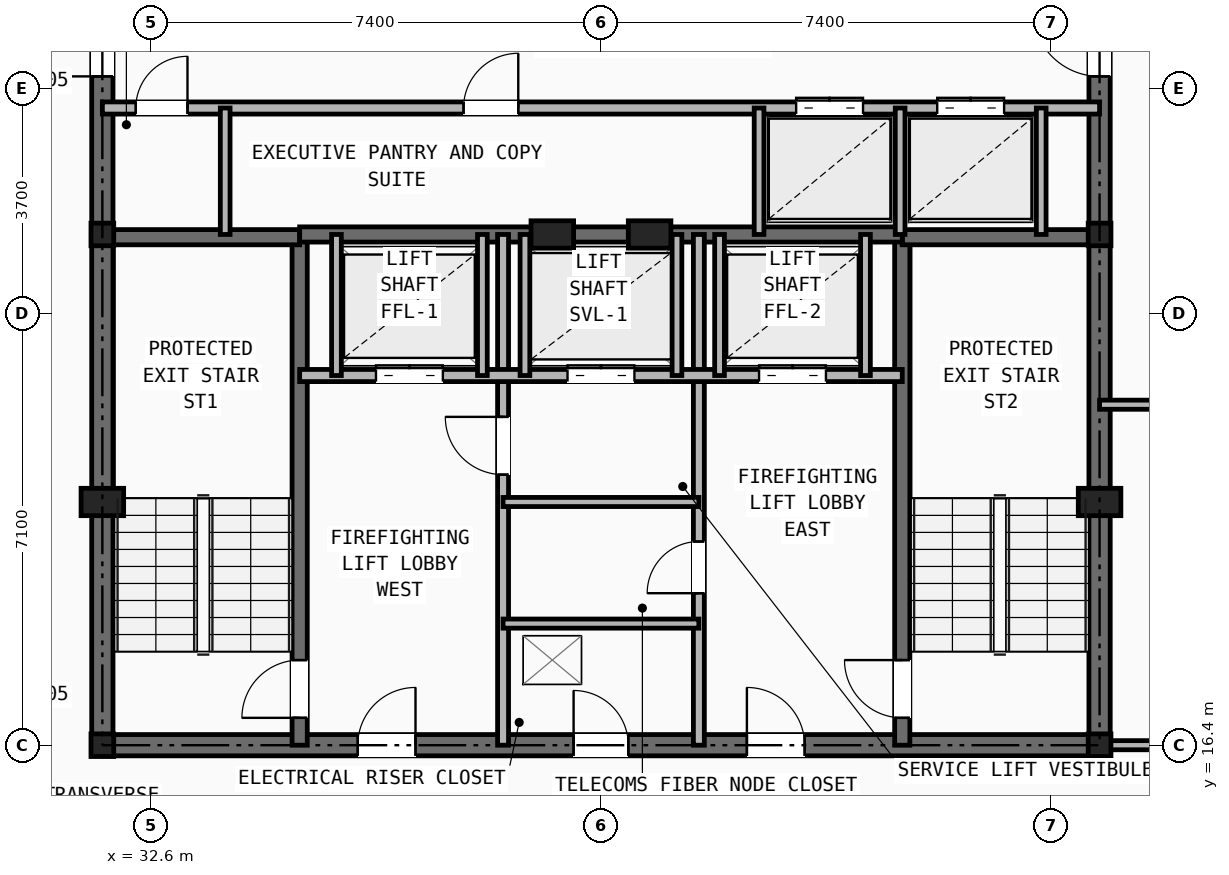
"""IFC4 building model, lengths in metres.
Left out: names, types, materials, properties, quantities, classifications, styles, units other than length and angle.
Written with IfcOpenShell. Run it as: python <this file> out.ifc"""

import sys

from ifc_helpers import new_model, si_unit, direction, frame, frame_2d, origin, origin_2d, place, context, subcontext, project, spatial, rectangle, i_section, extrude, element, fill, save


model = new_model("IFC4")
c1 = context("Model", 3, precision=1e-05, world=origin(), true_north=direction((0.0, 1.0)))
c2 = subcontext(c1, "Body", "Model", "MODEL_VIEW")
j1 = project(units=[si_unit("LENGTHUNIT", "METRE"), si_unit("PLANEANGLEUNIT", "RADIAN")], contexts=[c1])
p1 = place(None, origin())
s1 = spatial("IfcSite", under=j1, at=p1, CompositionType="ELEMENT")
p2 = place(p1, origin())
s2 = spatial("IfcBuilding", under=s1, at=p2, CompositionType="ELEMENT")
p3 = place(p2, frame((0.0, 0.0, 218.9)))
s3 = spatial("IfcBuildingStorey", under=s2, at=p3, CompositionType="ELEMENT", Elevation=218.9)
for number, where, z_axis, x_axis in (
    (1, (31.8, 16.4, 0.0), (0.0, 0.0, 1.0), (1.0, 0.0, 0.0)),
    (2, (48.2, 16.4, 0.0), (0.0, 0.0, 1.0), (1.0, 0.0, 0.0)),
    (3, (31.8, 24.8, 0.0), (0.0, 0.0, 1.0), (1.0, 0.0, 0.0)),
    (4, (48.2, 24.8, 0.0), (0.0, 0.0, 1.0), (1.0, 0.0, 0.0)),
):
    element("IfcColumn", number, at=place(p3, frame(where, z_axis=z_axis, x_axis=x_axis)), inside=s3, PredefinedType="COLUMN", context=c2, shape_type="SweptSolid", body=[
        extrude(i_section(OverallWidth=0.374, OverallDepth=0.372, WebThickness=0.016, FlangeThickness=0.026, at=origin_2d()), origin(), (0.0, 0.0, 1.0), 3.5),
    ])
for number, where, z_axis, x_axis in (
    (5, (31.8, 20.4, 0.0), (0.0, 0.0, 1.0), (1.0, 0.0, 0.0)),
    (6, (48.2, 20.4, 0.0), (0.0, 0.0, 1.0), (1.0, 0.0, 0.0)),
    (7, (39.2, 24.8, 0.0), (0.0, 0.0, 1.0), (1.0, 0.0, 0.0)),
    (8, (40.8, 24.8, 0.0), (0.0, 0.0, 1.0), (1.0, 0.0, 0.0)),
):
    element("IfcColumn", number, at=place(p3, frame(where, z_axis=z_axis, x_axis=x_axis)), inside=s3, PredefinedType="PILASTER", context=c2, shape_type="SweptSolid", body=[
        extrude(rectangle(XDim=0.7, YDim=0.45, at=origin_2d()), origin(), (0.0, 0.0, 1.0), 3.5),
    ])
p4 = place(p3, frame((31.8, 16.4, 0.0), z_axis=(0.0, 0.0, 1.0), x_axis=(1.0, 0.0, 0.0)))
e9 = element("IfcWall", 9, at=p4, inside=s3, PredefinedType="SHEAR", context=c2, shape_type="SweptSolid", body=[
    extrude(rectangle(XDim=16.4, YDim=0.35, at=frame_2d((8.2, 0.0))), origin(), (0.0, 0.0, 1.0), 3.25),
])
p5 = place(p4, frame((7.75, 0.0, 0.0)))
e10 = element("IfcOpeningElement", 10, at=p5, cuts=e9, PredefinedType="OPENING", context=c2, shape_type="SweptSolid", body=[
    extrude(rectangle(XDim=0.9, YDim=2.1, at=frame_2d((0.45, 1.05))), frame((0.0, 0.185, 0.0), z_axis=(0.0, -1.0, 0.0), x_axis=(1.0, 0.0, 0.0)), (0.0, 0.0, 1.0), 0.37),
])
p6 = place(p4, frame((4.2, 0.0, 0.0)))
e11 = element("IfcOpeningElement", 11, at=p6, cuts=e9, PredefinedType="OPENING", context=c2, shape_type="SweptSolid", body=[
    extrude(rectangle(XDim=0.95, YDim=2.1, at=frame_2d((0.475, 1.05))), frame((0.0, 0.185, 0.0), z_axis=(0.0, -1.0, 0.0), x_axis=(1.0, 0.0, 0.0)), (0.0, 0.0, 1.0), 0.37),
])
p7 = place(p4, frame((10.6, 0.0, 0.0)))
e12 = element("IfcOpeningElement", 12, at=p7, cuts=e9, PredefinedType="OPENING", context=c2, shape_type="SweptSolid", body=[
    extrude(rectangle(XDim=0.95, YDim=2.1, at=frame_2d((0.475, 1.05))), frame((0.0, 0.185, 0.0), z_axis=(0.0, -1.0, 0.0), x_axis=(1.0, 0.0, 0.0)), (0.0, 0.0, 1.0), 0.37),
])
p8 = place(p3, frame((31.8, 16.4, 0.0), z_axis=(0.0, 0.0, 1.0), x_axis=(0.0, 1.0, 0.0)))
e13 = element("IfcWall", 13, at=p8, inside=s3, PredefinedType="SHEAR", context=c2, shape_type="SweptSolid", body=[
    extrude(rectangle(XDim=14.8, YDim=0.35, at=frame_2d((7.4, 0.0))), origin(), (0.0, 0.0, 1.0), 3.25),
])
p9 = place(p8, frame((11.0, 0.0, 0.0)))
e14 = element("IfcOpeningElement", 14, at=p9, cuts=e13, PredefinedType="OPENING", context=c2, shape_type="SweptSolid", body=[
    extrude(rectangle(XDim=1.1, YDim=2.15, at=frame_2d((0.55, 1.075))), frame((0.0, 0.185, 0.0), z_axis=(0.0, -1.0, 0.0), x_axis=(1.0, 0.0, 0.0)), (0.0, 0.0, 1.0), 0.37),
])
p10 = place(p3, frame((48.2, 16.4, 0.0), z_axis=(0.0, 0.0, 1.0), x_axis=(0.0, 1.0, 0.0)))
e15 = element("IfcWall", 15, at=p10, inside=s3, PredefinedType="SHEAR", context=c2, shape_type="SweptSolid", body=[
    extrude(rectangle(XDim=14.8, YDim=0.35, at=frame_2d((7.4, 0.0))), origin(), (0.0, 0.0, 1.0), 3.25),
])
p11 = place(p10, frame((11.0, 0.0, 0.0)))
e16 = element("IfcOpeningElement", 16, at=p11, cuts=e15, PredefinedType="OPENING", context=c2, shape_type="SweptSolid", body=[
    extrude(rectangle(XDim=1.1, YDim=2.15, at=frame_2d((0.55, 1.075))), frame((0.0, 0.185, 0.0), z_axis=(0.0, -1.0, 0.0), x_axis=(1.0, 0.0, 0.0)), (0.0, 0.0, 1.0), 0.37),
])
p12 = place(p3, frame((35.045, 16.4, 0.0), z_axis=(0.0, 0.0, 1.0), x_axis=(0.0, 1.0, 0.0)))
e17 = element("IfcWall", 17, at=p12, inside=s3, PredefinedType="SHEAR", context=c2, shape_type="SweptSolid", body=[
    extrude(rectangle(XDim=8.4, YDim=0.25, at=frame_2d((4.2, 0.0))), origin(), (0.0, 0.0, 1.0), 3.25),
])
p13 = place(p12, frame((0.45, 0.0, 0.0)))
e18 = element("IfcOpeningElement", 18, at=p13, cuts=e17, PredefinedType="OPENING", context=c2, shape_type="SweptSolid", body=[
    extrude(rectangle(XDim=0.95, YDim=2.1, at=frame_2d((0.475, 1.05))), frame((0.0, 0.135, 0.0), z_axis=(0.0, -1.0, 0.0), x_axis=(1.0, 0.0, 0.0)), (0.0, 0.0, 1.0), 0.27),
])
p14 = place(p3, frame((31.8, 24.755, 0.0), z_axis=(0.0, 0.0, 1.0), x_axis=(1.0, 0.0, 0.0)))
e19 = element("IfcWall", 19, at=p14, inside=s3, PredefinedType="SHEAR", context=c2, shape_type="SweptSolid", body=[
    extrude(rectangle(XDim=3.245, YDim=0.25, at=frame_2d((1.623, 0.0))), origin(), (0.0, 0.0, 1.0), 3.25),
])
p15 = place(p3, frame((44.955, 16.4, 0.0), z_axis=(0.0, 0.0, 1.0), x_axis=(0.0, 1.0, 0.0)))
e20 = element("IfcWall", 20, at=p15, inside=s3, PredefinedType="SHEAR", context=c2, shape_type="SweptSolid", body=[
    extrude(rectangle(XDim=8.4, YDim=0.25, at=frame_2d((4.2, 0.0))), origin(), (0.0, 0.0, 1.0), 3.25),
])
p16 = place(p15, frame((0.45, 0.0, 0.0)))
e21 = element("IfcOpeningElement", 21, at=p16, cuts=e20, PredefinedType="OPENING", context=c2, shape_type="SweptSolid", body=[
    extrude(rectangle(XDim=0.95, YDim=2.1, at=frame_2d((0.475, 1.05))), frame((0.0, 0.135, 0.0), z_axis=(0.0, -1.0, 0.0), x_axis=(1.0, 0.0, 0.0)), (0.0, 0.0, 1.0), 0.27),
])
p17 = place(p3, frame((44.955, 24.755, 0.0), z_axis=(0.0, 0.0, 1.0), x_axis=(1.0, 0.0, 0.0)))
e22 = element("IfcWall", 22, at=p17, inside=s3, PredefinedType="SHEAR", context=c2, shape_type="SweptSolid", body=[
    extrude(rectangle(XDim=3.245, YDim=0.25, at=frame_2d((1.623, 0.0))), origin(), (0.0, 0.0, 1.0), 3.25),
])
p18 = place(p3, frame((35.045, 24.8, 0.0), z_axis=(0.0, 0.0, 1.0), x_axis=(1.0, 0.0, 0.0)))
e23 = element("IfcWall", 23, at=p18, inside=s3, PredefinedType="SHEAR", context=c2, shape_type="SweptSolid", body=[
    extrude(rectangle(XDim=9.91, YDim=0.25, at=frame_2d((4.955, 0.0))), origin(), (0.0, 0.0, 1.0), 3.25),
])
p19 = place(p3, frame((38.39, 16.4, 0.0), z_axis=(0.0, 0.0, 1.0), x_axis=(0.0, 1.0, 0.0)))
e24 = element("IfcWall", 24, at=p19, inside=s3, PredefinedType="PARTITIONING", context=c2, shape_type="SweptSolid", body=[
    extrude(rectangle(XDim=8.4, YDim=0.18, at=frame_2d((4.2, 0.0))), origin(), (0.0, 0.0, 1.0), 2.705),
])
p20 = place(p19, frame((4.45, 0.0, 0.0)))
e25 = element("IfcOpeningElement", 25, at=p20, cuts=e24, PredefinedType="OPENING", context=c2, shape_type="SweptSolid", body=[
    extrude(rectangle(XDim=0.95, YDim=2.1, at=frame_2d((0.475, 1.05))), frame((0.0, 0.1, 0.0), z_axis=(0.0, -1.0, 0.0), x_axis=(1.0, 0.0, 0.0)), (0.0, 0.0, 1.0), 0.2),
])
p21 = place(p3, frame((41.61, 16.4, 0.0), z_axis=(0.0, 0.0, 1.0), x_axis=(0.0, 1.0, 0.0)))
e26 = element("IfcWall", 26, at=p21, inside=s3, PredefinedType="PARTITIONING", context=c2, shape_type="SweptSolid", body=[
    extrude(rectangle(XDim=8.4, YDim=0.18, at=frame_2d((4.2, 0.0))), origin(), (0.0, 0.0, 1.0), 2.705),
])
p22 = place(p21, frame((2.5, 0.0, 0.0)))
e27 = element("IfcOpeningElement", 27, at=p22, cuts=e26, PredefinedType="OPENING", context=c2, shape_type="SweptSolid", body=[
    extrude(rectangle(XDim=0.85, YDim=2.05, at=frame_2d((0.425, 1.025))), frame((0.0, 0.1, 0.0), z_axis=(0.0, -1.0, 0.0), x_axis=(1.0, 0.0, 0.0)), (0.0, 0.0, 1.0), 0.2),
])
p23 = place(p3, frame((35.045, 22.48, 0.0), z_axis=(0.0, 0.0, 1.0), x_axis=(1.0, 0.0, 0.0)))
e28 = element("IfcWall", 28, at=p23, inside=s3, PredefinedType="SOLIDWALL", context=c2, shape_type="SweptSolid", body=[
    extrude(rectangle(XDim=9.91, YDim=0.2, at=frame_2d((4.955, 0.0))), origin(), (0.0, 0.0, 1.0), 3.25),
])
p24 = place(p23, frame((1.255, 0.0, 0.0)))
e29 = element("IfcOpeningElement", 29, at=p24, cuts=e28, PredefinedType="OPENING", context=c2, shape_type="SweptSolid", body=[
    extrude(rectangle(XDim=1.1, YDim=2.15, at=frame_2d((0.55, 1.075))), frame((0.0, 0.11, 0.0), z_axis=(0.0, -1.0, 0.0), x_axis=(1.0, 0.0, 0.0)), (0.0, 0.0, 1.0), 0.22),
])
p25 = place(p23, frame((7.555, 0.0, 0.0)))
e30 = element("IfcOpeningElement", 30, at=p25, cuts=e28, PredefinedType="OPENING", context=c2, shape_type="SweptSolid", body=[
    extrude(rectangle(XDim=1.1, YDim=2.15, at=frame_2d((0.55, 1.075))), frame((0.0, 0.11, 0.0), z_axis=(0.0, -1.0, 0.0), x_axis=(1.0, 0.0, 0.0)), (0.0, 0.0, 1.0), 0.22),
])
p26 = place(p23, frame((4.405, 0.0, 0.0)))
e31 = element("IfcOpeningElement", 31, at=p26, cuts=e28, PredefinedType="OPENING", context=c2, shape_type="SweptSolid", body=[
    extrude(rectangle(XDim=1.1, YDim=2.15, at=frame_2d((0.55, 1.075))), frame((0.0, 0.11, 0.0), z_axis=(0.0, -1.0, 0.0), x_axis=(1.0, 0.0, 0.0)), (0.0, 0.0, 1.0), 0.22),
])
for number, where, z_axis, x_axis in (
    (32, (38.39, 18.4, 0.0), (0.0, 0.0, 1.0), (1.0, 0.0, 0.0)),
    (33, (38.39, 20.4, 0.0), (0.0, 0.0, 1.0), (1.0, 0.0, 0.0)),
):
    element("IfcWall", number, at=place(p3, frame(where, z_axis=z_axis, x_axis=x_axis)), inside=s3, PredefinedType="PARTITIONING", context=c2, shape_type="SweptSolid", body=[
        extrude(rectangle(XDim=3.22, YDim=0.15, at=frame_2d((1.61, 0.0))), origin(), (0.0, 0.0, 1.0), 3.25),
    ])
for number, where, z_axis, x_axis in (
    (34, (35.65, 22.48, 0.0), (0.0, 0.0, 1.0), (0.0, 1.0, 0.0)),
    (35, (38.05, 22.48, 0.0), (0.0, 0.0, 1.0), (0.0, 1.0, 0.0)),
    (36, (41.95, 22.48, 0.0), (0.0, 0.0, 1.0), (0.0, 1.0, 0.0)),
    (37, (44.35, 22.48, 0.0), (0.0, 0.0, 1.0), (0.0, 1.0, 0.0)),
    (38, (38.75, 22.48, 0.0), (0.0, 0.0, 1.0), (0.0, 1.0, 0.0)),
    (39, (41.25, 22.48, 0.0), (0.0, 0.0, 1.0), (0.0, 1.0, 0.0)),
):
    element("IfcWall", number, at=place(p3, frame(where, z_axis=z_axis, x_axis=x_axis)), inside=s3, PredefinedType="SOLIDWALL", context=c2, shape_type="SweptSolid", body=[
        extrude(rectangle(XDim=2.32, YDim=0.16, at=frame_2d((1.16, 0.0))), origin(), (0.0, 0.0, 1.0), 3.25),
    ])
p27 = place(p3, frame((31.8, 26.88, 0.0), z_axis=(0.0, 0.0, 1.0), x_axis=(1.0, 0.0, 0.0)))
e40 = element("IfcWall", 40, at=p27, inside=s3, PredefinedType="SOLIDWALL", context=c2, shape_type="SweptSolid", body=[
    extrude(rectangle(XDim=16.4, YDim=0.2, at=frame_2d((8.2, 0.0))), origin(), (0.0, 0.0, 1.0), 2.705),
])
p28 = place(p27, frame((0.55, 0.0, 0.0)))
e41 = element("IfcOpeningElement", 41, at=p28, cuts=e40, PredefinedType="OPENING", context=c2, shape_type="SweptSolid", body=[
    extrude(rectangle(XDim=0.85, YDim=2.05, at=frame_2d((0.425, 1.025))), frame((0.0, 0.11, 0.0), z_axis=(0.0, -1.0, 0.0), x_axis=(1.0, 0.0, 0.0)), (0.0, 0.0, 1.0), 0.22),
])
p29 = place(p27, frame((5.94, 0.0, 0.0)))
e42 = element("IfcOpeningElement", 42, at=p29, cuts=e40, PredefinedType="OPENING", context=c2, shape_type="SweptSolid", body=[
    extrude(rectangle(XDim=0.9, YDim=2.1, at=frame_2d((0.45, 1.05))), frame((0.0, 0.11, 0.0), z_axis=(0.0, -1.0, 0.0), x_axis=(1.0, 0.0, 0.0)), (0.0, 0.0, 1.0), 0.22),
])
p30 = place(p27, frame((11.41, 0.0, 0.0)))
e43 = element("IfcOpeningElement", 43, at=p30, cuts=e40, PredefinedType="OPENING", context=c2, shape_type="SweptSolid", body=[
    extrude(rectangle(XDim=1.1, YDim=2.15, at=frame_2d((0.55, 1.075))), frame((0.0, 0.11, 0.0), z_axis=(0.0, -1.0, 0.0), x_axis=(1.0, 0.0, 0.0)), (0.0, 0.0, 1.0), 0.22),
])
p31 = place(p27, frame((13.73, 0.0, 0.0)))
e44 = element("IfcOpeningElement", 44, at=p31, cuts=e40, PredefinedType="OPENING", context=c2, shape_type="SweptSolid", body=[
    extrude(rectangle(XDim=1.1, YDim=2.15, at=frame_2d((0.55, 1.075))), frame((0.0, 0.11, 0.0), z_axis=(0.0, -1.0, 0.0), x_axis=(1.0, 0.0, 0.0)), (0.0, 0.0, 1.0), 0.22),
])
for number, where, z_axis, x_axis in (
    (45, (33.82, 24.8, 0.0), (0.0, 0.0, 1.0), (0.0, 1.0, 0.0)),
    (46, (42.6, 24.8, 0.0), (0.0, 0.0, 1.0), (0.0, 1.0, 0.0)),
    (47, (44.92, 24.8, 0.0), (0.0, 0.0, 1.0), (0.0, 1.0, 0.0)),
    (48, (47.24, 24.8, 0.0), (0.0, 0.0, 1.0), (0.0, 1.0, 0.0)),
):
    element("IfcWall", number, at=place(p3, frame(where, z_axis=z_axis, x_axis=x_axis)), inside=s3, PredefinedType="SOLIDWALL", context=c2, shape_type="SweptSolid", body=[
        extrude(rectangle(XDim=2.08, YDim=0.16, at=frame_2d((1.04, 0.0))), origin(), (0.0, 0.0, 1.0), 3.25),
    ])
p32 = place(p3, frame((48.2, 16.4, 0.0), z_axis=(0.0, 0.0, 1.0), x_axis=(1.0, 0.0, 0.0)))
e49 = element("IfcWall", 49, at=p32, inside=s3, PredefinedType="PARTITIONING", context=c2, shape_type="SweptSolid", body=[
    extrude(rectangle(XDim=15.888, YDim=0.15, at=frame_2d((7.944, 0.0))), origin(), (0.0, 0.0, 1.0), 2.292),
])
p33 = place(p3, frame((48.2, 22.0, 0.0), z_axis=(0.0, 0.0, 1.0), x_axis=(1.0, 0.0, 0.0)))
e50 = element("IfcWall", 50, at=p33, inside=s3, PredefinedType="PARTITIONING", context=c2, shape_type="SweptSolid", body=[
    extrude(rectangle(XDim=12.052, YDim=0.15, at=frame_2d((6.026, 0.0))), origin(), (0.0, 0.0, 1.0), 2.292),
])
p34 = place(p33, frame((1.4, 0.0, 0.0)))
e51 = element("IfcOpeningElement", 51, at=p34, cuts=e50, PredefinedType="OPENING", context=c2, shape_type="SweptSolid", body=[
    extrude(rectangle(XDim=0.95, YDim=2.1, at=frame_2d((0.475, 1.05))), frame((0.0, 0.085, 0.0), z_axis=(0.0, -1.0, 0.0), x_axis=(1.0, 0.0, 0.0)), (0.0, 0.0, 1.0), 0.17),
])
p35 = place(p5, origin())
e52 = element("IfcDoor", 52, at=p35, inside=s3, OperationType="SINGLE_SWING_LEFT", PredefinedType="DOOR", context=c2, shape_type="SweptSolid", body=[
    extrude(rectangle(XDim=0.9, YDim=2.1, at=frame_2d((0.45, 1.05))), frame((0.0, 0.025, 0.0), z_axis=(0.0, -1.0, 0.0), x_axis=(1.0, 0.0, 0.0)), (0.0, 0.0, 1.0), 0.05),
])
fill(e10, e52)
p36 = place(p22, origin())
e53 = element("IfcDoor", 53, at=p36, inside=s3, OperationType="SINGLE_SWING_LEFT", PredefinedType="DOOR", context=c2, shape_type="SweptSolid", body=[
    extrude(rectangle(XDim=0.85, YDim=2.05, at=frame_2d((0.425, 1.025))), frame((0.0, 0.025, 0.0), z_axis=(0.0, -1.0, 0.0), x_axis=(1.0, 0.0, 0.0)), (0.0, 0.0, 1.0), 0.05),
])
fill(e27, e53)
p37 = place(p20, origin())
e54 = element("IfcDoor", 54, at=p37, inside=s3, OperationType="SINGLE_SWING_RIGHT", PredefinedType="DOOR", context=c2, shape_type="SweptSolid", body=[
    extrude(rectangle(XDim=0.95, YDim=2.1, at=frame_2d((0.475, 1.05))), frame((0.0, 0.025, 0.0), z_axis=(0.0, -1.0, 0.0), x_axis=(1.0, 0.0, 0.0)), (0.0, 0.0, 1.0), 0.05),
])
fill(e25, e54)
p38 = place(p13, origin())
e55 = element("IfcDoor", 55, at=p38, inside=s3, OperationType="SINGLE_SWING_LEFT", PredefinedType="DOOR", context=c2, shape_type="SweptSolid", body=[
    extrude(rectangle(XDim=0.95, YDim=2.1, at=frame_2d((0.475, 1.05))), frame((0.0, 0.025, 0.0), z_axis=(0.0, -1.0, 0.0), x_axis=(1.0, 0.0, 0.0)), (0.0, 0.0, 1.0), 0.05),
])
fill(e18, e55)
p39 = place(p16, origin())
e56 = element("IfcDoor", 56, at=p39, inside=s3, OperationType="SINGLE_SWING_RIGHT", PredefinedType="DOOR", context=c2, shape_type="SweptSolid", body=[
    extrude(rectangle(XDim=0.95, YDim=2.1, at=frame_2d((0.475, 1.05))), frame((0.0, 0.025, 0.0), z_axis=(0.0, -1.0, 0.0), x_axis=(1.0, 0.0, 0.0)), (0.0, 0.0, 1.0), 0.05),
])
fill(e21, e56)
p40 = place(p6, origin())
e57 = element("IfcDoor", 57, at=p40, inside=s3, OperationType="SINGLE_SWING_RIGHT", PredefinedType="DOOR", context=c2, shape_type="SweptSolid", body=[
    extrude(rectangle(XDim=0.95, YDim=2.1, at=frame_2d((0.475, 1.05))), frame((0.0, 0.025, 0.0), z_axis=(0.0, -1.0, 0.0), x_axis=(1.0, 0.0, 0.0)), (0.0, 0.0, 1.0), 0.05),
])
fill(e11, e57)
p41 = place(p7, origin())
e58 = element("IfcDoor", 58, at=p41, inside=s3, OperationType="SINGLE_SWING_LEFT", PredefinedType="DOOR", context=c2, shape_type="SweptSolid", body=[
    extrude(rectangle(XDim=0.95, YDim=2.1, at=frame_2d((0.475, 1.05))), frame((0.0, 0.025, 0.0), z_axis=(0.0, -1.0, 0.0), x_axis=(1.0, 0.0, 0.0)), (0.0, 0.0, 1.0), 0.05),
])
fill(e12, e58)
p42 = place(p24, origin())
e59 = element("IfcDoor", 59, at=p42, inside=s3, OperationType="DOUBLE_DOOR_SLIDING", PredefinedType="DOOR", context=c2, shape_type="SweptSolid", body=[
    extrude(rectangle(XDim=1.1, YDim=2.15, at=frame_2d((0.55, 1.075))), frame((0.0, 0.025, 0.0), z_axis=(0.0, -1.0, 0.0), x_axis=(1.0, 0.0, 0.0)), (0.0, 0.0, 1.0), 0.05),
])
fill(e29, e59)
p43 = place(p25, origin())
e60 = element("IfcDoor", 60, at=p43, inside=s3, OperationType="DOUBLE_DOOR_SLIDING", PredefinedType="DOOR", context=c2, shape_type="SweptSolid", body=[
    extrude(rectangle(XDim=1.1, YDim=2.15, at=frame_2d((0.55, 1.075))), frame((0.0, 0.025, 0.0), z_axis=(0.0, -1.0, 0.0), x_axis=(1.0, 0.0, 0.0)), (0.0, 0.0, 1.0), 0.05),
])
fill(e30, e60)
p44 = place(p26, origin())
e61 = element("IfcDoor", 61, at=p44, inside=s3, OperationType="DOUBLE_DOOR_SLIDING", PredefinedType="DOOR", context=c2, shape_type="SweptSolid", body=[
    extrude(rectangle(XDim=1.1, YDim=2.15, at=frame_2d((0.55, 1.075))), frame((0.0, 0.025, 0.0), z_axis=(0.0, -1.0, 0.0), x_axis=(1.0, 0.0, 0.0)), (0.0, 0.0, 1.0), 0.05),
])
fill(e31, e61)
p45 = place(p28, origin())
e62 = element("IfcDoor", 62, at=p45, inside=s3, OperationType="SINGLE_SWING_RIGHT", PredefinedType="DOOR", context=c2, shape_type="SweptSolid", body=[
    extrude(rectangle(XDim=0.85, YDim=2.05, at=frame_2d((0.425, 1.025))), frame((0.0, 0.025, 0.0), z_axis=(0.0, -1.0, 0.0), x_axis=(1.0, 0.0, 0.0)), (0.0, 0.0, 1.0), 0.05),
])
fill(e41, e62)
p46 = place(p9, origin())
e63 = element("IfcDoor", 63, at=p46, inside=s3, OperationType="SINGLE_SWING_LEFT", PredefinedType="DOOR", context=c2, shape_type="SweptSolid", body=[
    extrude(rectangle(XDim=1.1, YDim=2.15, at=frame_2d((0.55, 1.075))), frame((0.0, 0.025, 0.0), z_axis=(0.0, -1.0, 0.0), x_axis=(1.0, 0.0, 0.0)), (0.0, 0.0, 1.0), 0.05),
])
fill(e14, e63)
p47 = place(p11, origin())
e64 = element("IfcDoor", 64, at=p47, inside=s3, OperationType="SINGLE_SWING_RIGHT", PredefinedType="DOOR", context=c2, shape_type="SweptSolid", body=[
    extrude(rectangle(XDim=1.1, YDim=2.15, at=frame_2d((0.55, 1.075))), frame((0.0, 0.025, 0.0), z_axis=(0.0, -1.0, 0.0), x_axis=(1.0, 0.0, 0.0)), (0.0, 0.0, 1.0), 0.05),
])
fill(e16, e64)
p48 = place(p29, origin())
e65 = element("IfcDoor", 65, at=p48, inside=s3, OperationType="SINGLE_SWING_RIGHT", PredefinedType="DOOR", context=c2, shape_type="SweptSolid", body=[
    extrude(rectangle(XDim=0.9, YDim=2.1, at=frame_2d((0.45, 1.05))), frame((0.0, 0.025, 0.0), z_axis=(0.0, -1.0, 0.0), x_axis=(1.0, 0.0, 0.0)), (0.0, 0.0, 1.0), 0.05),
])
fill(e42, e65)
p49 = place(p30, origin())
e66 = element("IfcDoor", 66, at=p49, inside=s3, OperationType="DOUBLE_DOOR_SLIDING", PredefinedType="DOOR", context=c2, shape_type="SweptSolid", body=[
    extrude(rectangle(XDim=1.1, YDim=2.15, at=frame_2d((0.55, 1.075))), frame((0.0, 0.025, 0.0), z_axis=(0.0, -1.0, 0.0), x_axis=(1.0, 0.0, 0.0)), (0.0, 0.0, 1.0), 0.05),
])
fill(e43, e66)
p50 = place(p31, origin())
e67 = element("IfcDoor", 67, at=p50, inside=s3, OperationType="DOUBLE_DOOR_SLIDING", PredefinedType="DOOR", context=c2, shape_type="SweptSolid", body=[
    extrude(rectangle(XDim=1.1, YDim=2.15, at=frame_2d((0.55, 1.075))), frame((0.0, 0.025, 0.0), z_axis=(0.0, -1.0, 0.0), x_axis=(1.0, 0.0, 0.0)), (0.0, 0.0, 1.0), 0.05),
])
fill(e44, e67)
save(model, sys.argv[1])
